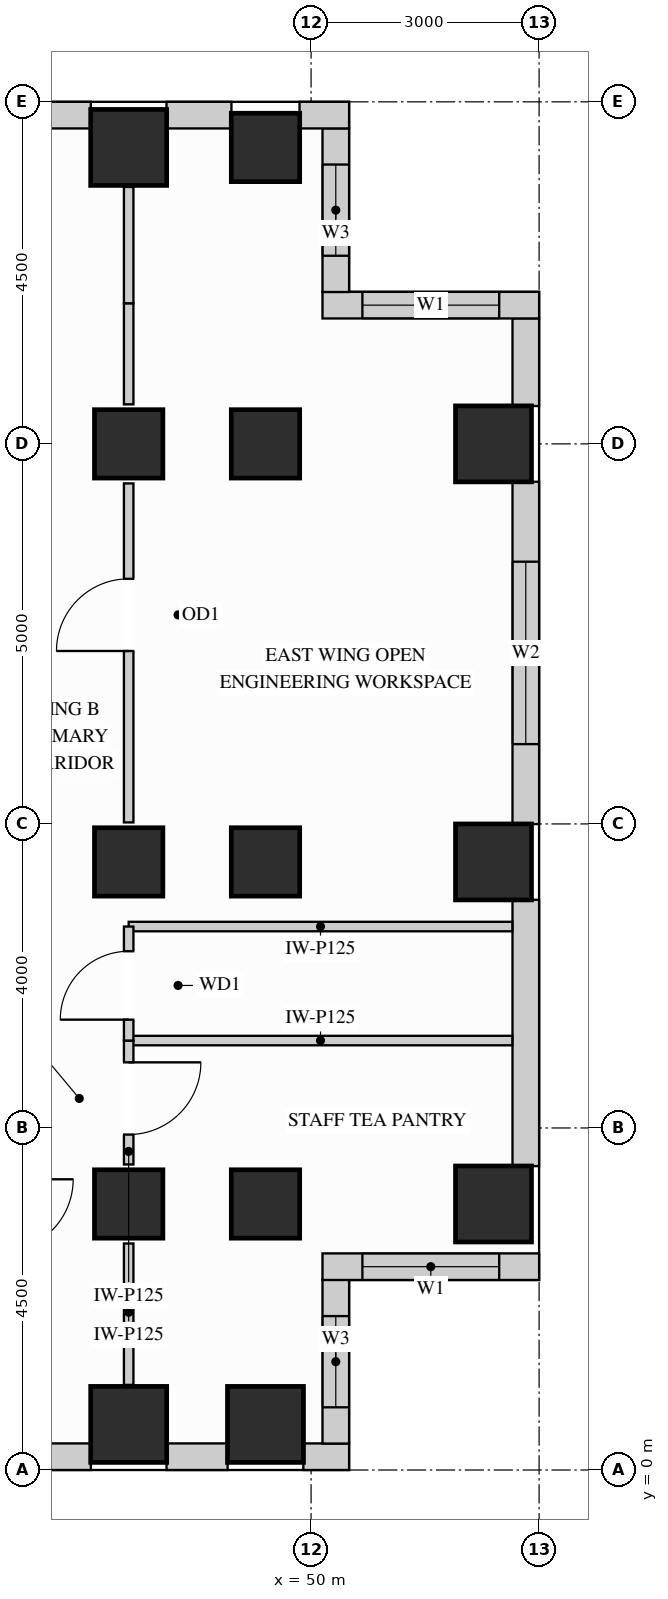
"""IFC4 building model, lengths in metres.
Left out: names, types, materials, properties, quantities, classifications, styles, units other than length and angle.
Written with IfcOpenShell. Run it as: python <this file> out.ifc"""

import sys

from ifc_helpers import new_model, si_unit, direction, frame, frame_2d, origin, origin_2d, place, context, subcontext, project, spatial, rectangle, extrude, source, transform, mapped, element, fill, save


model = new_model("IFC4")
c1 = context("Model", 3, precision=1e-05, world=origin(), true_north=direction((0.0, 1.0)))
c2 = subcontext(c1, "Body", "Model", "MODEL_VIEW")
j1 = project(units=[si_unit("LENGTHUNIT", "METRE"), si_unit("PLANEANGLEUNIT", "RADIAN")], contexts=[c1])
p1 = place(None, origin())
s1 = spatial("IfcSite", under=j1, at=p1, CompositionType="ELEMENT")
p2 = place(p1, origin())
s2 = spatial("IfcBuilding", under=s1, at=p2, CompositionType="ELEMENT")
p3 = place(p2, frame((0.0, 0.0, 175.5)))
s3 = spatial("IfcBuildingStorey", under=s2, at=p3, CompositionType="ELEMENT", Elevation=175.5)
m1 = source(origin(), c2, "Body", "SweptSolid", [
    extrude(rectangle(XDim=0.9, YDim=0.9, at=origin_2d()), origin(), (0.0, 0.0, 1.0), 3.4),
])
for number, where, z_axis, x_axis in (
    (1, (47.6, 13.5, 0.0), (0.0, 0.0, 1.0), (1.0, 0.0, 0.0)),
    (2, (47.6, 3.5, 0.0), (0.0, 0.0, 1.0), (1.0, 0.0, 0.0)),
    (3, (47.6, 8.0, 0.0), (0.0, 0.0, 1.0), (1.0, 0.0, 0.0)),
    (4, (49.4, 13.5, 0.0), (0.0, 0.0, 1.0), (1.0, 0.0, 0.0)),
    (5, (49.4, 17.4, 0.0), (0.0, 0.0, 1.0), (1.0, 0.0, 0.0)),
    (6, (49.4, 3.5, 0.0), (0.0, 0.0, 1.0), (1.0, 0.0, 0.0)),
    (7, (49.4, 8.0, 0.0), (0.0, 0.0, 1.0), (1.0, 0.0, 0.0)),
):
    element("IfcColumn", number, at=place(p3, frame(where, z_axis=z_axis, x_axis=x_axis)), inside=s3, PredefinedType="COLUMN", context=c2, shape_type="MappedRepresentation", body=[
        mapped(m1, transform((0.0, 0.0, 0.0), x_axis=(1.0, 0.0, 0.0), y_axis=(0.0, 1.0, 0.0), z_axis=(0.0, 0.0, 1.0))),
    ])
m2 = source(origin(), c2, "Body", "SweptSolid", [
    extrude(rectangle(XDim=1.0, YDim=1.0, at=origin_2d()), origin(), (0.0, 0.0, 1.0), 3.4),
])
for number, where, z_axis, x_axis in (
    (8, (47.6, 17.4, 0.0), (0.0, 0.0, 1.0), (1.0, 0.0, 0.0)),
    (9, (52.4, 13.5, 0.0), (0.0, 0.0, 1.0), (1.0, 0.0, 0.0)),
    (10, (52.4, 3.5, 0.0), (0.0, 0.0, 1.0), (1.0, 0.0, 0.0)),
    (11, (52.4, 8.0, 0.0), (0.0, 0.0, 1.0), (1.0, 0.0, 0.0)),
    (12, (47.6, 0.6, 0.0), (0.0, 0.0, 1.0), (1.0, 0.0, 0.0)),
    (13, (49.4, 0.6, 0.0), (0.0, 0.0, 1.0), (1.0, 0.0, 0.0)),
):
    element("IfcColumn", number, at=place(p3, frame(where, z_axis=z_axis, x_axis=x_axis)), inside=s3, PredefinedType="COLUMN", context=c2, shape_type="MappedRepresentation", body=[
        mapped(m2, transform((0.0, 0.0, 0.0), x_axis=(1.0, 0.0, 0.0), y_axis=(0.0, 1.0, 0.0), z_axis=(0.0, 0.0, 1.0))),
    ])
p4 = place(p3, frame((40.498, 0.175, 0.0), z_axis=(0.0, 0.0, 1.0), x_axis=(1.0, 0.0, 0.0)))
e14 = element("IfcWall", 14, at=p4, inside=s3, PredefinedType="SOLIDWALL", context=c2, shape_type="SweptSolid", body=[
    extrude(rectangle(XDim=6.604, YDim=0.35, at=frame_2d((3.302, 0.0))), origin(), (0.0, 0.0, 1.0), 2.448),
])
p5 = place(p4, frame((0.737, 0.0, 0.78)))
e15 = element("IfcOpeningElement", 15, at=p5, cuts=e14, PredefinedType="OPENING", context=c2, shape_type="SweptSolid", body=[
    extrude(rectangle(XDim=1.8, YDim=1.488, at=frame_2d((0.9, 0.744))), frame((0.0, 0.185, 0.0), z_axis=(0.0, -1.0, 0.0), x_axis=(1.0, 0.0, 0.0)), (0.0, 0.0, 1.0), 0.37),
])
p6 = place(p4, frame((2.955, 0.0, 0.78)))
e16 = element("IfcOpeningElement", 16, at=p6, cuts=e14, PredefinedType="OPENING", context=c2, shape_type="SweptSolid", body=[
    extrude(rectangle(XDim=1.8, YDim=1.488, at=frame_2d((0.9, 0.744))), frame((0.0, 0.185, 0.0), z_axis=(0.0, -1.0, 0.0), x_axis=(1.0, 0.0, 0.0)), (0.0, 0.0, 1.0), 0.37),
])
m3 = source(origin(), c2, "Body", "SweptSolid", [
    extrude(rectangle(XDim=0.804, YDim=0.35, at=frame_2d((0.402, 0.0))), origin(), (0.0, 0.0, 1.0), 3.385),
])
p7 = place(p3, frame((48.098, 0.175, 0.0), z_axis=(0.0, 0.0, 1.0), x_axis=(1.0, 0.0, 0.0)))
e17 = element("IfcWall", 17, at=p7, inside=s3, PredefinedType="SOLIDWALL", context=c2, shape_type="MappedRepresentation", body=[
    mapped(m3, transform((0.0, 0.0, 0.0), x_axis=(1.0, 0.0, 0.0), y_axis=(0.0, 1.0, 0.0), z_axis=(0.0, 0.0, 1.0))),
])
m4 = source(origin(), c2, "Body", "SweptSolid", [
    extrude(rectangle(XDim=0.602, YDim=0.35, at=frame_2d((0.301, 0.0))), origin(), (0.0, 0.0, 1.0), 3.385),
])
p8 = place(p3, frame((49.898, 0.175, 0.0), z_axis=(0.0, 0.0, 1.0), x_axis=(1.0, 0.0, 0.0)))
e18 = element("IfcWall", 18, at=p8, inside=s3, PredefinedType="SOLIDWALL", context=c2, shape_type="MappedRepresentation", body=[
    mapped(m4, transform((0.0, 0.0, 0.0), x_axis=(1.0, 0.0, 0.0), y_axis=(0.0, 1.0, 0.0), z_axis=(0.0, 0.0, 1.0))),
])
p9 = place(p3, frame((50.325, 0.348, 0.0), z_axis=(0.0, 0.0, 1.0), x_axis=(0.0, 1.0, 0.0)))
e19 = element("IfcWall", 19, at=p9, inside=s3, PredefinedType="SOLIDWALL", context=c2, shape_type="SweptSolid", body=[
    extrude(rectangle(XDim=2.154, YDim=0.35, at=frame_2d((1.077, 0.0))), origin(), (0.0, 0.0, 1.0), 3.385),
])
p10 = place(p9, frame((0.477, 0.0, 0.78)))
e20 = element("IfcOpeningElement", 20, at=p10, cuts=e19, PredefinedType="OPENING", context=c2, shape_type="SweptSolid", body=[
    extrude(rectangle(XDim=1.2, YDim=2.1, at=frame_2d((0.6, 1.05))), frame((0.0, 0.185, 0.0), z_axis=(0.0, -1.0, 0.0), x_axis=(1.0, 0.0, 0.0)), (0.0, 0.0, 1.0), 0.37),
])
p11 = place(p3, frame((50.15, 2.675, 0.0), z_axis=(0.0, 0.0, 1.0), x_axis=(1.0, 0.0, 0.0)))
e21 = element("IfcWall", 21, at=p11, inside=s3, PredefinedType="SOLIDWALL", context=c2, shape_type="SweptSolid", body=[
    extrude(rectangle(XDim=2.85, YDim=0.35, at=frame_2d((1.425, 0.0))), origin(), (0.0, 0.0, 1.0), 3.385),
])
p12 = place(p11, frame((0.525, 0.0, 0.78)))
e22 = element("IfcOpeningElement", 22, at=p12, cuts=e21, PredefinedType="OPENING", context=c2, shape_type="SweptSolid", body=[
    extrude(rectangle(XDim=1.8, YDim=2.1, at=frame_2d((0.9, 1.05))), frame((0.0, 0.185, 0.0), z_axis=(0.0, -1.0, 0.0), x_axis=(1.0, 0.0, 0.0)), (0.0, 0.0, 1.0), 0.37),
])
m5 = source(origin(), c2, "Body", "SweptSolid", [
    extrude(rectangle(XDim=3.504, YDim=0.35, at=frame_2d((1.752, 0.0))), origin(), (0.0, 0.0, 1.0), 2.612),
])
p13 = place(p3, frame((52.825, 3.998, 0.0), z_axis=(0.0, 0.0, 1.0), x_axis=(0.0, 1.0, 0.0)))
e23 = element("IfcWall", 23, at=p13, inside=s3, PredefinedType="SOLIDWALL", context=c2, shape_type="MappedRepresentation", body=[
    mapped(m5, transform((0.0, 0.0, 0.0), x_axis=(1.0, 0.0, 0.0), y_axis=(0.0, 1.0, 0.0), z_axis=(0.0, 0.0, 1.0))),
])
p14 = place(p3, frame((52.825, 8.498, 0.0), z_axis=(0.0, 0.0, 1.0), x_axis=(0.0, 1.0, 0.0)))
e24 = element("IfcWall", 24, at=p14, inside=s3, PredefinedType="SOLIDWALL", context=c2, shape_type="SweptSolid", body=[
    extrude(rectangle(XDim=4.504, YDim=0.35, at=frame_2d((2.252, 0.0))), origin(), (0.0, 0.0, 1.0), 2.612),
])
p15 = place(p14, frame((1.052, 0.0, 0.78)))
e25 = element("IfcOpeningElement", 25, at=p15, cuts=e24, PredefinedType="OPENING", context=c2, shape_type="SweptSolid", body=[
    extrude(rectangle(XDim=2.4, YDim=1.652, at=frame_2d((1.2, 0.826))), frame((0.0, 0.185, 0.0), z_axis=(0.0, -1.0, 0.0), x_axis=(1.0, 0.0, 0.0)), (0.0, 0.0, 1.0), 0.37),
])
m6 = source(origin(), c2, "Body", "SweptSolid", [
    extrude(rectangle(XDim=1.154, YDim=0.35, at=frame_2d((0.577, 0.0))), origin(), (0.0, 0.0, 1.0), 3.385),
])
p16 = place(p3, frame((52.825, 13.998, 0.0), z_axis=(0.0, 0.0, 1.0), x_axis=(0.0, 1.0, 0.0)))
e26 = element("IfcWall", 26, at=p16, inside=s3, PredefinedType="SOLIDWALL", context=c2, shape_type="MappedRepresentation", body=[
    mapped(m6, transform((0.0, 0.0, 0.0), x_axis=(1.0, 0.0, 0.0), y_axis=(0.0, 1.0, 0.0), z_axis=(0.0, 0.0, 1.0))),
])
p17 = place(p3, frame((53.0, 15.325, 0.0), z_axis=(0.0, 0.0, 1.0), x_axis=(-1.0, 0.0, 0.0)))
e27 = element("IfcWall", 27, at=p17, inside=s3, PredefinedType="SOLIDWALL", context=c2, shape_type="SweptSolid", body=[
    extrude(rectangle(XDim=2.85, YDim=0.35, at=frame_2d((1.425, 0.0))), origin(), (0.0, 0.0, 1.0), 3.385),
])
p18 = place(p17, frame((0.525, 0.0, 0.78)))
e28 = element("IfcOpeningElement", 28, at=p18, cuts=e27, PredefinedType="OPENING", context=c2, shape_type="SweptSolid", body=[
    extrude(rectangle(XDim=1.8, YDim=2.1, at=frame_2d((0.9, 1.05))), frame((0.0, 0.185, 0.0), z_axis=(0.0, -1.0, 0.0), x_axis=(1.0, 0.0, 0.0)), (0.0, 0.0, 1.0), 0.37),
])
p19 = place(p3, frame((50.325, 15.498, 0.0), z_axis=(0.0, 0.0, 1.0), x_axis=(0.0, 1.0, 0.0)))
e29 = element("IfcWall", 29, at=p19, inside=s3, PredefinedType="SOLIDWALL", context=c2, shape_type="SweptSolid", body=[
    extrude(rectangle(XDim=2.154, YDim=0.35, at=frame_2d((1.077, 0.0))), origin(), (0.0, 0.0, 1.0), 3.385),
])
p20 = place(p19, frame((0.477, 0.0, 0.78)))
e30 = element("IfcOpeningElement", 30, at=p20, cuts=e29, PredefinedType="OPENING", context=c2, shape_type="SweptSolid", body=[
    extrude(rectangle(XDim=1.2, YDim=2.1, at=frame_2d((0.6, 1.05))), frame((0.0, 0.185, 0.0), z_axis=(0.0, -1.0, 0.0), x_axis=(1.0, 0.0, 0.0)), (0.0, 0.0, 1.0), 0.37),
])
m7 = source(origin(), c2, "Body", "SweptSolid", [
    extrude(rectangle(XDim=0.652, YDim=0.35, at=frame_2d((0.326, 0.0))), origin(), (0.0, 0.0, 1.0), 3.385),
])
p21 = place(p3, frame((50.5, 17.825, 0.0), z_axis=(0.0, 0.0, 1.0), x_axis=(-1.0, 0.0, 0.0)))
e31 = element("IfcWall", 31, at=p21, inside=s3, PredefinedType="SOLIDWALL", context=c2, shape_type="MappedRepresentation", body=[
    mapped(m7, transform((0.0, 0.0, 0.0), x_axis=(1.0, 0.0, 0.0), y_axis=(0.0, 1.0, 0.0), z_axis=(0.0, 0.0, 1.0))),
])
m8 = source(origin(), c2, "Body", "SweptSolid", [
    extrude(rectangle(XDim=0.854, YDim=0.35, at=frame_2d((0.427, 0.0))), origin(), (0.0, 0.0, 1.0), 3.385),
])
p22 = place(p3, frame((48.952, 17.825, 0.0), z_axis=(0.0, 0.0, 1.0), x_axis=(-1.0, 0.0, 0.0)))
e32 = element("IfcWall", 32, at=p22, inside=s3, PredefinedType="SOLIDWALL", context=c2, shape_type="MappedRepresentation", body=[
    mapped(m8, transform((0.0, 0.0, 0.0), x_axis=(1.0, 0.0, 0.0), y_axis=(0.0, 1.0, 0.0), z_axis=(0.0, 0.0, 1.0))),
])
p23 = place(p3, frame((47.102, 17.825, 0.0), z_axis=(0.0, 0.0, 1.0), x_axis=(-1.0, 0.0, 0.0)))
e33 = element("IfcWall", 33, at=p23, inside=s3, PredefinedType="SOLIDWALL", context=c2, shape_type="SweptSolid", body=[
    extrude(rectangle(XDim=6.604, YDim=0.35, at=frame_2d((3.302, 0.0))), origin(), (0.0, 0.0, 1.0), 2.612),
])
p24 = place(p23, frame((1.849, 0.0, 0.78)))
e34 = element("IfcOpeningElement", 34, at=p24, cuts=e33, PredefinedType="OPENING", context=c2, shape_type="SweptSolid", body=[
    extrude(rectangle(XDim=1.8, YDim=1.652, at=frame_2d((0.9, 0.826))), frame((0.0, 0.185, 0.0), z_axis=(0.0, -1.0, 0.0), x_axis=(1.0, 0.0, 0.0)), (0.0, 0.0, 1.0), 0.37),
])
p25 = place(p23, frame((4.067, 0.0, 0.78)))
e35 = element("IfcOpeningElement", 35, at=p25, cuts=e33, PredefinedType="OPENING", context=c2, shape_type="SweptSolid", body=[
    extrude(rectangle(XDim=1.8, YDim=1.652, at=frame_2d((0.9, 0.826))), frame((0.0, 0.185, 0.0), z_axis=(0.0, -1.0, 0.0), x_axis=(1.0, 0.0, 0.0)), (0.0, 0.0, 1.0), 0.37),
])
m9 = source(origin(), c2, "Body", "SweptSolid", [
    extrude(rectangle(XDim=5.048, YDim=0.125, at=frame_2d((2.524, 0.0))), origin(), (0.0, 0.0, 1.0), 3.385),
])
for number, where, z_axis, x_axis in (
    (36, (47.6, 5.65, 0.0), (0.0, 0.0, 1.0), (1.0, 0.0, 0.0)),
    (37, (47.6, 7.15, 0.0), (0.0, 0.0, 1.0), (1.0, 0.0, 0.0)),
):
    element("IfcWall", number, at=place(p3, frame(where, z_axis=z_axis, x_axis=x_axis)), inside=s3, PredefinedType="PARTITIONING", context=c2, shape_type="MappedRepresentation", body=[
        mapped(m9, transform((0.0, 0.0, 0.0), x_axis=(1.0, 0.0, 0.0), y_axis=(0.0, 1.0, 0.0), z_axis=(0.0, 0.0, 1.0))),
    ])
p26 = place(p3, frame((47.6, 4.02, 0.0), z_axis=(0.0, 0.0, 1.0), x_axis=(0.0, 1.0, 0.0)))
e38 = element("IfcWall", 38, at=p26, inside=s3, PredefinedType="PARTITIONING", context=c2, shape_type="SweptSolid", body=[
    extrude(rectangle(XDim=1.63, YDim=0.125, at=frame_2d((0.815, 0.0))), origin(), (0.0, 0.0, 1.0), 2.773),
])
p27 = place(p26, frame((0.393, 0.0, 0.0)))
e39 = element("IfcOpeningElement", 39, at=p27, cuts=e38, PredefinedType="OPENING", context=c2, shape_type="SweptSolid", body=[
    extrude(rectangle(XDim=0.95, YDim=2.15, at=frame_2d((0.475, 1.075))), frame((0.0, 0.073, 0.0), z_axis=(0.0, -1.0, 0.0), x_axis=(1.0, 0.0, 0.0)), (0.0, 0.0, 1.0), 0.145),
])
m10 = source(origin(), c2, "Body", "SweptSolid", [
    extrude(rectangle(XDim=1.86, YDim=0.125, at=frame_2d((0.93, 0.0))), origin(), (0.0, 0.0, 1.0), 2.773),
])
p28 = place(p3, frame((47.6, 1.12, 0.0), z_axis=(0.0, 0.0, 1.0), x_axis=(0.0, 1.0, 0.0)))
e40 = element("IfcWall", 40, at=p28, inside=s3, PredefinedType="PARTITIONING", context=c2, shape_type="MappedRepresentation", body=[
    mapped(m10, transform((0.0, 0.0, 0.0), x_axis=(1.0, 0.0, 0.0), y_axis=(0.0, 1.0, 0.0), z_axis=(0.0, 0.0, 1.0))),
])
p29 = place(p3, frame((47.6, 8.52, 0.0), z_axis=(0.0, 0.0, 1.0), x_axis=(0.0, 1.0, 0.0)))
e41 = element("IfcWall", 41, at=p29, inside=s3, PredefinedType="PARTITIONING", context=c2, shape_type="SweptSolid", body=[
    extrude(rectangle(XDim=4.46, YDim=0.125, at=frame_2d((2.23, 0.0))), origin(), (0.0, 0.0, 1.0), 2.773),
])
p30 = place(p29, frame((2.255, 0.0, 0.0)))
e42 = element("IfcOpeningElement", 42, at=p30, cuts=e41, PredefinedType="OPENING", context=c2, shape_type="SweptSolid", body=[
    extrude(rectangle(XDim=0.95, YDim=2.15, at=frame_2d((0.475, 1.075))), frame((0.0, 0.073, 0.0), z_axis=(0.0, -1.0, 0.0), x_axis=(1.0, 0.0, 0.0)), (0.0, 0.0, 1.0), 0.145),
])
m11 = source(origin(), c2, "Body", "SweptSolid", [
    extrude(rectangle(XDim=1.33, YDim=0.125, at=frame_2d((0.665, 0.0))), origin(), (0.0, 0.0, 1.0), 2.773),
])
p31 = place(p3, frame((47.6, 14.02, 0.0), z_axis=(0.0, 0.0, 1.0), x_axis=(0.0, 1.0, 0.0)))
e43 = element("IfcWall", 43, at=p31, inside=s3, PredefinedType="PARTITIONING", context=c2, shape_type="MappedRepresentation", body=[
    mapped(m11, transform((0.0, 0.0, 0.0), x_axis=(1.0, 0.0, 0.0), y_axis=(0.0, 1.0, 0.0), z_axis=(0.0, 0.0, 1.0))),
])
m12 = source(origin(), c2, "Body", "SweptSolid", [
    extrude(rectangle(XDim=1.53, YDim=0.125, at=frame_2d((0.765, 0.0))), origin(), (0.0, 0.0, 1.0), 2.773),
])
p32 = place(p3, frame((47.6, 15.35, 0.0), z_axis=(0.0, 0.0, 1.0), x_axis=(0.0, 1.0, 0.0)))
e44 = element("IfcWall", 44, at=p32, inside=s3, PredefinedType="PARTITIONING", context=c2, shape_type="MappedRepresentation", body=[
    mapped(m12, transform((0.0, 0.0, 0.0), x_axis=(1.0, 0.0, 0.0), y_axis=(0.0, 1.0, 0.0), z_axis=(0.0, 0.0, 1.0))),
])
p33 = place(p3, frame((47.6, 5.65, 0.0), z_axis=(0.0, 0.0, 1.0), x_axis=(0.0, 1.0, 0.0)))
e45 = element("IfcWall", 45, at=p33, inside=s3, PredefinedType="PARTITIONING", context=c2, shape_type="SweptSolid", body=[
    extrude(rectangle(XDim=1.5, YDim=0.125, at=frame_2d((0.75, 0.0))), origin(), (0.0, 0.0, 1.0), 2.773),
])
p34 = place(p33, frame((0.275, 0.0, 0.0)))
e46 = element("IfcOpeningElement", 46, at=p34, cuts=e45, PredefinedType="OPENING", context=c2, shape_type="SweptSolid", body=[
    extrude(rectangle(XDim=0.9, YDim=2.15, at=frame_2d((0.45, 1.075))), frame((0.0, 0.073, 0.0), z_axis=(0.0, -1.0, 0.0), x_axis=(1.0, 0.0, 0.0)), (0.0, 0.0, 1.0), 0.145),
])
m13 = source(origin(), c2, "Body", "SweptSolid", [
    extrude(rectangle(XDim=0.95, YDim=2.15, at=frame_2d((0.475, 1.075))), frame((0.0, 0.025, 0.0), z_axis=(0.0, -1.0, 0.0), x_axis=(1.0, 0.0, 0.0)), (0.0, 0.0, 1.0), 0.05),
])
p35 = place(p27, origin())
e47 = element("IfcDoor", 47, at=p35, inside=s3, OperationType="SINGLE_SWING_RIGHT", PredefinedType="DOOR", context=c2, shape_type="MappedRepresentation", body=[
    mapped(m13, transform((0.0, 0.0, 0.0), x_axis=(1.0, 0.0, 0.0), y_axis=(0.0, 1.0, 0.0), z_axis=(0.0, 0.0, 1.0))),
])
fill(e39, e47)
p36 = place(p30, origin())
e48 = element("IfcDoor", 48, at=p36, inside=s3, OperationType="SINGLE_SWING_LEFT", PredefinedType="DOOR", context=c2, shape_type="MappedRepresentation", body=[
    mapped(m13, transform((0.0, 0.0, 0.0), x_axis=(1.0, 0.0, 0.0), y_axis=(0.0, 1.0, 0.0), z_axis=(0.0, 0.0, 1.0))),
])
fill(e42, e48)
m14 = source(origin(), c2, "Body", "SweptSolid", [
    extrude(rectangle(XDim=0.9, YDim=2.15, at=frame_2d((0.45, 1.075))), frame((0.0, 0.025, 0.0), z_axis=(0.0, -1.0, 0.0), x_axis=(1.0, 0.0, 0.0)), (0.0, 0.0, 1.0), 0.05),
])
p37 = place(p34, origin())
e49 = element("IfcDoor", 49, at=p37, inside=s3, OperationType="SINGLE_SWING_LEFT", PredefinedType="DOOR", context=c2, shape_type="MappedRepresentation", body=[
    mapped(m14, transform((0.0, 0.0, 0.0), x_axis=(1.0, 0.0, 0.0), y_axis=(0.0, 1.0, 0.0), z_axis=(0.0, 0.0, 1.0))),
])
fill(e46, e49)
m15 = source(origin(), c2, "Body", "SweptSolid", [
    extrude(rectangle(XDim=1.8, YDim=2.1, at=frame_2d((0.9, 1.05))), frame((0.0, 0.03, 0.0), z_axis=(0.0, -1.0, 0.0), x_axis=(1.0, 0.0, 0.0)), (0.0, 0.0, 1.0), 0.06),
])
p38 = place(p12, origin())
e50 = element("IfcWindow", 50, at=p38, inside=s3, PartitioningType="SINGLE_PANEL", PredefinedType="WINDOW", context=c2, shape_type="MappedRepresentation", body=[
    mapped(m15, transform((0.0, 0.0, 0.0), x_axis=(1.0, 0.0, 0.0), y_axis=(0.0, 1.0, 0.0), z_axis=(0.0, 0.0, 1.0))),
])
fill(e22, e50)
p39 = place(p18, origin())
e51 = element("IfcWindow", 51, at=p39, inside=s3, PartitioningType="SINGLE_PANEL", PredefinedType="WINDOW", context=c2, shape_type="MappedRepresentation", body=[
    mapped(m15, transform((0.0, 0.0, 0.0), x_axis=(1.0, 0.0, 0.0), y_axis=(0.0, 1.0, 0.0), z_axis=(0.0, 0.0, 1.0))),
])
fill(e28, e51)
m16 = source(origin(), c2, "Body", "SweptSolid", [
    extrude(rectangle(XDim=2.4, YDim=1.652, at=frame_2d((1.2, 0.826))), frame((0.0, 0.03, 0.0), z_axis=(0.0, -1.0, 0.0), x_axis=(1.0, 0.0, 0.0)), (0.0, 0.0, 1.0), 0.06),
])
p40 = place(p15, origin())
e52 = element("IfcWindow", 52, at=p40, inside=s3, PartitioningType="SINGLE_PANEL", PredefinedType="WINDOW", context=c2, shape_type="MappedRepresentation", body=[
    mapped(m16, transform((0.0, 0.0, 0.0), x_axis=(1.0, 0.0, 0.0), y_axis=(0.0, 1.0, 0.0), z_axis=(0.0, 0.0, 1.0))),
])
fill(e25, e52)
m17 = source(origin(), c2, "Body", "SweptSolid", [
    extrude(rectangle(XDim=1.2, YDim=2.1, at=frame_2d((0.6, 1.05))), frame((0.0, 0.03, 0.0), z_axis=(0.0, -1.0, 0.0), x_axis=(1.0, 0.0, 0.0)), (0.0, 0.0, 1.0), 0.06),
])
p41 = place(p10, origin())
e53 = element("IfcWindow", 53, at=p41, inside=s3, PartitioningType="SINGLE_PANEL", PredefinedType="WINDOW", context=c2, shape_type="MappedRepresentation", body=[
    mapped(m17, transform((0.0, 0.0, 0.0), x_axis=(1.0, 0.0, 0.0), y_axis=(0.0, 1.0, 0.0), z_axis=(0.0, 0.0, 1.0))),
])
fill(e20, e53)
p42 = place(p20, origin())
e54 = element("IfcWindow", 54, at=p42, inside=s3, PartitioningType="SINGLE_PANEL", PredefinedType="WINDOW", context=c2, shape_type="MappedRepresentation", body=[
    mapped(m17, transform((0.0, 0.0, 0.0), x_axis=(1.0, 0.0, 0.0), y_axis=(0.0, 1.0, 0.0), z_axis=(0.0, 0.0, 1.0))),
])
fill(e30, e54)
save(model, sys.argv[1])
